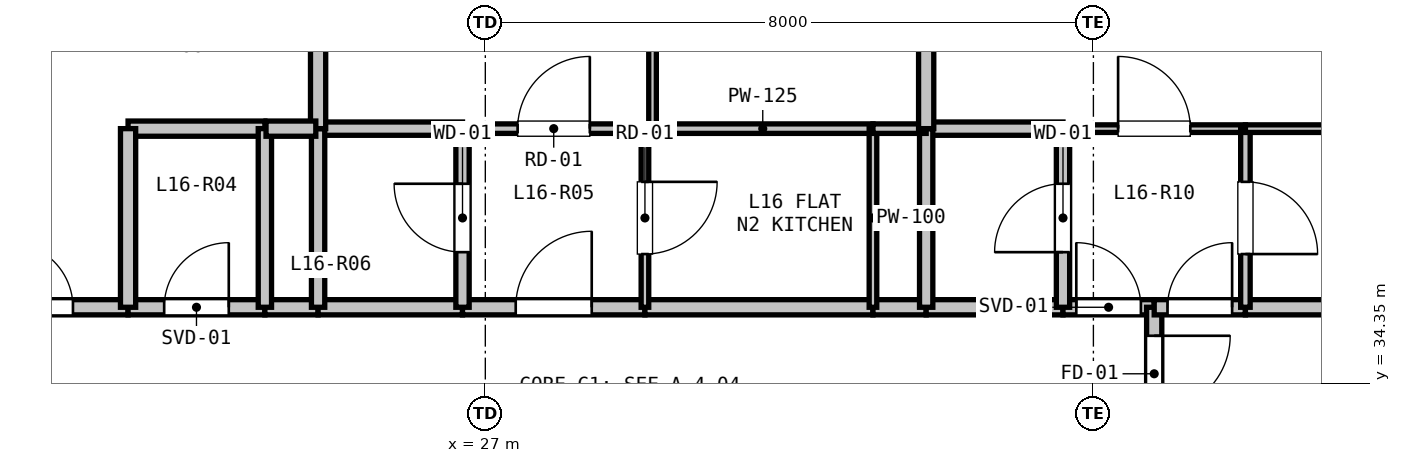
"""IFC4 building model, lengths in metres.
Left out: names, types, materials, properties, quantities, classifications, styles, units other than length and angle.
Written with IfcOpenShell. Run it as: python <this file> out.ifc"""

import sys

from ifc_helpers import new_model, si_unit, direction, frame, frame_2d, origin, place, context, subcontext, project, spatial, rectangle, extrude, element, fill, save


model = new_model("IFC4")
c1 = context("Model", 3, precision=1e-05, world=origin(), true_north=direction((0.0, 1.0)))
c2 = subcontext(c1, "Body", "Model", "MODEL_VIEW")
j1 = project(units=[si_unit("LENGTHUNIT", "METRE"), si_unit("PLANEANGLEUNIT", "RADIAN")], contexts=[c1])
p1 = place(None, origin())
s1 = spatial("IfcSite", under=j1, at=p1, CompositionType="ELEMENT")
p2 = place(p1, origin())
s2 = spatial("IfcBuilding", under=s1, at=p2, CompositionType="ELEMENT")
p3 = place(p2, frame((0.0, 0.0, 58.8)))
s3 = spatial("IfcBuildingStorey", under=s2, at=p3, CompositionType="ELEMENT", Elevation=58.8)
p4 = place(p3, frame((16.39, 36.617, 0.0), z_axis=(0.0, 0.0, 1.0), x_axis=(0.866027351828, 0.499996625875, 0.0)))
e1 = element("IfcWall", 1, at=p4, inside=s3, PredefinedType="PARAPET", context=c2, shape_type="SweptSolid", body=[
    extrude(rectangle(XDim=11.973, YDim=0.2, at=frame_2d((5.987, 0.0))), origin(), (0.0, 0.0, 1.0), 0.2),
])
p5 = place(p3, frame((20.0, 35.35, 0.0), z_axis=(0.0, 0.0, 1.0), x_axis=(1.0, 0.0, 0.0)))
e2 = element("IfcWall", 2, at=p5, inside=s3, PredefinedType="PARTITIONING", context=c2, shape_type="SweptSolid", body=[
    extrude(rectangle(XDim=2.3, YDim=0.2, at=frame_2d((1.15, 0.0))), origin(), (0.0, 0.0, 1.0), 3.02),
])
p6 = place(p5, frame((0.725, 0.0, 0.0)))
e3 = element("IfcOpeningElement", 3, at=p6, cuts=e2, PredefinedType="OPENING", context=c2, shape_type="SweptSolid", body=[
    extrude(rectangle(XDim=0.85, YDim=2.1, at=frame_2d((0.425, 1.05))), frame((0.0, 0.11, 0.0), z_axis=(0.0, -1.0, 0.0), x_axis=(1.0, 0.0, 0.0)), (0.0, 0.0, 1.0), 0.22),
])
p7 = place(p3, frame((22.3, 35.35, 0.0), z_axis=(0.0, 0.0, 1.0), x_axis=(1.0, 0.0, 0.0)))
e4 = element("IfcWall", 4, at=p7, inside=s3, PredefinedType="PARTITIONING", context=c2, shape_type="SweptSolid", body=[
    extrude(rectangle(XDim=1.8, YDim=0.2, at=frame_2d((0.9, 0.0))), origin(), (0.0, 0.0, 1.0), 3.02),
])
p8 = place(p7, frame((0.475, 0.0, 0.0)))
e5 = element("IfcOpeningElement", 5, at=p8, cuts=e4, PredefinedType="OPENING", context=c2, shape_type="SweptSolid", body=[
    extrude(rectangle(XDim=0.85, YDim=2.1, at=frame_2d((0.425, 1.05))), frame((0.0, 0.11, 0.0), z_axis=(0.0, -1.0, 0.0), x_axis=(1.0, 0.0, 0.0)), (0.0, 0.0, 1.0), 0.22),
])
p9 = place(p3, frame((24.1, 35.35, 0.0), z_axis=(0.0, 0.0, 1.0), x_axis=(1.0, 0.0, 0.0)))
e6 = element("IfcWall", 6, at=p9, inside=s3, PredefinedType="PARTITIONING", context=c2, shape_type="SweptSolid", body=[
    extrude(rectangle(XDim=0.7, YDim=0.2, at=frame_2d((0.35, 0.0))), origin(), (0.0, 0.0, 1.0), 3.02),
])
p10 = place(p3, frame((24.8, 35.35, 0.0), z_axis=(0.0, 0.0, 1.0), x_axis=(1.0, 0.0, 0.0)))
e7 = element("IfcWall", 7, at=p10, inside=s3, PredefinedType="PARTITIONING", context=c2, shape_type="SweptSolid", body=[
    extrude(rectangle(XDim=1.9, YDim=0.2, at=frame_2d((0.95, 0.0))), origin(), (0.0, 0.0, 1.0), 3.02),
])
p11 = place(p3, frame((26.7, 35.35, 0.0), z_axis=(0.0, 0.0, 1.0), x_axis=(1.0, 0.0, 0.0)))
e8 = element("IfcWall", 8, at=p11, inside=s3, PredefinedType="PARTITIONING", context=c2, shape_type="SweptSolid", body=[
    extrude(rectangle(XDim=2.4, YDim=0.2, at=frame_2d((1.2, 0.0))), origin(), (0.0, 0.0, 1.0), 3.02),
])
p12 = place(p11, frame((0.7, 0.0, 0.0)))
e9 = element("IfcOpeningElement", 9, at=p12, cuts=e8, PredefinedType="OPENING", context=c2, shape_type="SweptSolid", body=[
    extrude(rectangle(XDim=1.0, YDim=2.15, at=frame_2d((0.5, 1.075))), frame((0.0, 0.11, 0.0), z_axis=(0.0, -1.0, 0.0), x_axis=(1.0, 0.0, 0.0)), (0.0, 0.0, 1.0), 0.22),
])
p13 = place(p3, frame((29.1, 35.35, 0.0), z_axis=(0.0, 0.0, 1.0), x_axis=(1.0, 0.0, 0.0)))
e10 = element("IfcWall", 10, at=p13, inside=s3, PredefinedType="PARTITIONING", context=c2, shape_type="SweptSolid", body=[
    extrude(rectangle(XDim=3.0, YDim=0.2, at=frame_2d((1.5, 0.0))), origin(), (0.0, 0.0, 1.0), 3.02),
])
p14 = place(p3, frame((32.1, 35.35, 0.0), z_axis=(0.0, 0.0, 1.0), x_axis=(1.0, 0.0, 0.0)))
e11 = element("IfcWall", 11, at=p14, inside=s3, PredefinedType="PARTITIONING", context=c2, shape_type="SweptSolid", body=[
    extrude(rectangle(XDim=0.7, YDim=0.2, at=frame_2d((0.35, 0.0))), origin(), (0.0, 0.0, 1.0), 3.02),
])
p15 = place(p3, frame((32.8, 35.35, 0.0), z_axis=(0.0, 0.0, 1.0), x_axis=(1.0, 0.0, 0.0)))
e12 = element("IfcWall", 12, at=p15, inside=s3, PredefinedType="PARTITIONING", context=c2, shape_type="SweptSolid", body=[
    extrude(rectangle(XDim=1.8, YDim=0.2, at=frame_2d((0.9, 0.0))), origin(), (0.0, 0.0, 1.0), 3.02),
])
p16 = place(p3, frame((34.6, 35.35, 0.0), z_axis=(0.0, 0.0, 1.0), x_axis=(1.0, 0.0, 0.0)))
e13 = element("IfcWall", 13, at=p16, inside=s3, PredefinedType="PARTITIONING", context=c2, shape_type="SweptSolid", body=[
    extrude(rectangle(XDim=1.2, YDim=0.2, at=frame_2d((0.6, 0.0))), origin(), (0.0, 0.0, 1.0), 3.02),
])
p17 = place(p16, frame((0.175, 0.0, 0.0)))
e14 = element("IfcOpeningElement", 14, at=p17, cuts=e13, PredefinedType="OPENING", context=c2, shape_type="SweptSolid", body=[
    extrude(rectangle(XDim=0.85, YDim=2.1, at=frame_2d((0.425, 1.05))), frame((0.0, 0.11, 0.0), z_axis=(0.0, -1.0, 0.0), x_axis=(1.0, 0.0, 0.0)), (0.0, 0.0, 1.0), 0.22),
])
p18 = place(p3, frame((35.8, 35.35, 0.0), z_axis=(0.0, 0.0, 1.0), x_axis=(0.0, -1.0, 0.0)))
e15 = element("IfcWall", 15, at=p18, inside=s3, PredefinedType="PARTITIONING", context=c2, shape_type="SweptSolid", body=[
    extrude(rectangle(XDim=1.75, YDim=0.2, at=frame_2d((0.875, 0.0))), origin(), (0.0, 0.0, 1.0), 3.02),
])
p19 = place(p18, frame((0.375, 0.0, 0.0)))
e16 = element("IfcOpeningElement", 16, at=p19, cuts=e15, PredefinedType="OPENING", context=c2, shape_type="SweptSolid", body=[
    extrude(rectangle(XDim=1.0, YDim=2.15, at=frame_2d((0.5, 1.075))), frame((0.0, 0.11, 0.0), z_axis=(0.0, -1.0, 0.0), x_axis=(1.0, 0.0, 0.0)), (0.0, 0.0, 1.0), 0.22),
])
p20 = place(p3, frame((35.8, 35.35, 0.0), z_axis=(0.0, 0.0, 1.0), x_axis=(1.0, 0.0, 0.0)))
e17 = element("IfcWall", 17, at=p20, inside=s3, PredefinedType="PARTITIONING", context=c2, shape_type="SweptSolid", body=[
    extrude(rectangle(XDim=1.2, YDim=0.2, at=frame_2d((0.6, 0.0))), origin(), (0.0, 0.0, 1.0), 2.317),
])
p21 = place(p20, frame((0.175, 0.0, 0.0)))
e18 = element("IfcOpeningElement", 18, at=p21, cuts=e17, PredefinedType="OPENING", context=c2, shape_type="SweptSolid", body=[
    extrude(rectangle(XDim=0.85, YDim=2.1, at=frame_2d((0.425, 1.05))), frame((0.0, 0.11, 0.0), z_axis=(0.0, -1.0, 0.0), x_axis=(1.0, 0.0, 0.0)), (0.0, 0.0, 1.0), 0.22),
])
p22 = place(p3, frame((37.0, 35.35, 0.0), z_axis=(0.0, 0.0, 1.0), x_axis=(1.0, 0.0, 0.0)))
e19 = element("IfcWall", 19, at=p22, inside=s3, PredefinedType="PARTITIONING", context=c2, shape_type="SweptSolid", body=[
    extrude(rectangle(XDim=1.4, YDim=0.2, at=frame_2d((0.7, 0.0))), origin(), (0.0, 0.0, 1.0), 2.317),
])
p23 = place(p3, frame((26.7, 37.7, 0.0), z_axis=(0.0, 0.0, 1.0), x_axis=(1.0, 0.0, 0.0)))
e20 = element("IfcWall", 20, at=p23, inside=s3, PredefinedType="PARTITIONING", context=c2, shape_type="SweptSolid", body=[
    extrude(rectangle(XDim=2.4, YDim=0.125, at=frame_2d((1.2, 0.0))), origin(), (0.0, 0.0, 1.0), 3.02),
])
p24 = place(p23, frame((0.725, 0.0, 0.0)))
e21 = element("IfcOpeningElement", 21, at=p24, cuts=e20, PredefinedType="OPENING", context=c2, shape_type="SweptSolid", body=[
    extrude(rectangle(XDim=0.95, YDim=2.1, at=frame_2d((0.475, 1.05))), frame((0.0, 0.073, 0.0), z_axis=(0.0, -1.0, 0.0), x_axis=(1.0, 0.0, 0.0)), (0.0, 0.0, 1.0), 0.145),
])
p25 = place(p3, frame((29.1, 37.7, 0.0), z_axis=(0.0, 0.0, 1.0), x_axis=(0.0, -1.0, 0.0)))
e22 = element("IfcWall", 22, at=p25, inside=s3, PredefinedType="PARTITIONING", context=c2, shape_type="SweptSolid", body=[
    extrude(rectangle(XDim=2.35, YDim=0.1, at=frame_2d((1.175, 0.0))), origin(), (0.0, 0.0, 1.0), 3.02),
])
p26 = place(p25, frame((0.7, 0.0, 0.0)))
e23 = element("IfcOpeningElement", 23, at=p26, cuts=e22, PredefinedType="OPENING", context=c2, shape_type="SweptSolid", body=[
    extrude(rectangle(XDim=0.95, YDim=2.1, at=frame_2d((0.475, 1.05))), frame((0.0, 0.06, 0.0), z_axis=(0.0, -1.0, 0.0), x_axis=(1.0, 0.0, 0.0)), (0.0, 0.0, 1.0), 0.12),
])
p27 = place(p3, frame((26.7, 35.35, 0.0), z_axis=(0.0, 0.0, 1.0), x_axis=(0.0, 1.0, 0.0)))
e24 = element("IfcWall", 24, at=p27, inside=s3, PredefinedType="PLUMBINGWALL", context=c2, shape_type="SweptSolid", body=[
    extrude(rectangle(XDim=2.35, YDim=0.175, at=frame_2d((1.175, 0.0))), origin(), (0.0, 0.0, 1.0), 3.02),
])
p28 = place(p27, frame((0.725, 0.0, 0.0)))
e25 = element("IfcOpeningElement", 25, at=p28, cuts=e24, PredefinedType="OPENING", context=c2, shape_type="SweptSolid", body=[
    extrude(rectangle(XDim=0.9, YDim=2.1, at=frame_2d((0.45, 1.05))), frame((0.0, 0.097, 0.0), z_axis=(0.0, -1.0, 0.0), x_axis=(1.0, 0.0, 0.0)), (0.0, 0.0, 1.0), 0.195),
])
p29 = place(p3, frame((34.6, 37.7, 0.0), z_axis=(0.0, 0.0, 1.0), x_axis=(1.0, 0.0, 0.0)))
e26 = element("IfcWall", 26, at=p29, inside=s3, PredefinedType="PARTITIONING", context=c2, shape_type="SweptSolid", body=[
    extrude(rectangle(XDim=2.4, YDim=0.1, at=frame_2d((1.2, 0.0))), origin(), (0.0, 0.0, 1.0), 2.317),
])
p30 = place(p29, frame((0.725, 0.0, 0.0)))
e27 = element("IfcOpeningElement", 27, at=p30, cuts=e26, PredefinedType="OPENING", context=c2, shape_type="SweptSolid", body=[
    extrude(rectangle(XDim=0.95, YDim=2.1, at=frame_2d((0.475, 1.05))), frame((0.0, 0.06, 0.0), z_axis=(0.0, -1.0, 0.0), x_axis=(1.0, 0.0, 0.0)), (0.0, 0.0, 1.0), 0.12),
])
p31 = place(p3, frame((37.0, 37.7, 0.0), z_axis=(0.0, 0.0, 1.0), x_axis=(0.0, -1.0, 0.0)))
e28 = element("IfcWall", 28, at=p31, inside=s3, PredefinedType="PARTITIONING", context=c2, shape_type="SweptSolid", body=[
    extrude(rectangle(XDim=2.35, YDim=0.125, at=frame_2d((1.175, 0.0))), origin(), (0.0, 0.0, 1.0), 2.317),
])
p32 = place(p31, frame((0.7, 0.0, 0.0)))
e29 = element("IfcOpeningElement", 29, at=p32, cuts=e28, PredefinedType="OPENING", context=c2, shape_type="SweptSolid", body=[
    extrude(rectangle(XDim=0.95, YDim=2.1, at=frame_2d((0.475, 1.05))), frame((0.0, 0.073, 0.0), z_axis=(0.0, -1.0, 0.0), x_axis=(1.0, 0.0, 0.0)), (0.0, 0.0, 1.0), 0.145),
])
p33 = place(p3, frame((34.6, 35.35, 0.0), z_axis=(0.0, 0.0, 1.0), x_axis=(0.0, 1.0, 0.0)))
e30 = element("IfcWall", 30, at=p33, inside=s3, PredefinedType="PLUMBINGWALL", context=c2, shape_type="SweptSolid", body=[
    extrude(rectangle(XDim=2.35, YDim=0.175, at=frame_2d((1.175, 0.0))), origin(), (0.0, 0.0, 1.0), 3.02),
])
p34 = place(p33, frame((0.725, 0.0, 0.0)))
e31 = element("IfcOpeningElement", 31, at=p34, cuts=e30, PredefinedType="OPENING", context=c2, shape_type="SweptSolid", body=[
    extrude(rectangle(XDim=0.9, YDim=2.1, at=frame_2d((0.45, 1.05))), frame((0.0, 0.097, 0.0), z_axis=(0.0, -1.0, 0.0), x_axis=(1.0, 0.0, 0.0)), (0.0, 0.0, 1.0), 0.195),
])
p35 = place(p3, frame((22.3, 37.7, 0.0), z_axis=(0.0, 0.0, 1.0), x_axis=(1.0, 0.0, 0.0)))
e32 = element("IfcWall", 32, at=p35, inside=s3, PredefinedType="PARTITIONING", context=c2, shape_type="SweptSolid", body=[
    extrude(rectangle(XDim=1.8, YDim=0.2, at=frame_2d((0.9, 0.0))), origin(), (0.0, 0.0, 1.0), 3.02),
])
p36 = place(p3, frame((24.1, 37.7, 0.0), z_axis=(0.0, 0.0, 1.0), x_axis=(0.0, -1.0, 0.0)))
e33 = element("IfcWall", 33, at=p36, inside=s3, PredefinedType="PLUMBINGWALL", context=c2, shape_type="SweptSolid", body=[
    extrude(rectangle(XDim=2.35, YDim=0.175, at=frame_2d((1.175, 0.0))), origin(), (0.0, 0.0, 1.0), 3.02),
])
p37 = place(p3, frame((22.3, 35.35, 0.0), z_axis=(0.0, 0.0, 1.0), x_axis=(0.0, 1.0, 0.0)))
e34 = element("IfcWall", 34, at=p37, inside=s3, PredefinedType="PARTITIONING", context=c2, shape_type="SweptSolid", body=[
    extrude(rectangle(XDim=2.35, YDim=0.2, at=frame_2d((1.175, 0.0))), origin(), (0.0, 0.0, 1.0), 3.02),
])
p38 = place(p3, frame((24.8, 37.7, 0.0), z_axis=(0.0, 0.0, 1.0), x_axis=(1.0, 0.0, 0.0)))
e35 = element("IfcWall", 35, at=p38, inside=s3, PredefinedType="PLUMBINGWALL", context=c2, shape_type="SweptSolid", body=[
    extrude(rectangle(XDim=1.9, YDim=0.175, at=frame_2d((0.95, 0.0))), origin(), (0.0, 0.0, 1.0), 3.02),
])
p39 = place(p3, frame((24.8, 35.35, 0.0), z_axis=(0.0, 0.0, 1.0), x_axis=(0.0, 1.0, 0.0)))
e36 = element("IfcWall", 36, at=p39, inside=s3, PredefinedType="PLUMBINGWALL", context=c2, shape_type="SweptSolid", body=[
    extrude(rectangle(XDim=2.35, YDim=0.175, at=frame_2d((1.175, 0.0))), origin(), (0.0, 0.0, 1.0), 3.02),
])
p40 = place(p3, frame((29.2, 37.7, 0.0), z_axis=(0.0, 0.0, 1.0), x_axis=(1.0, 0.0, 0.0)))
e37 = element("IfcWall", 37, at=p40, inside=s3, PredefinedType="PARTITIONING", context=c2, shape_type="SweptSolid", body=[
    extrude(rectangle(XDim=2.9, YDim=0.125, at=frame_2d((1.45, 0.0))), origin(), (0.0, 0.0, 1.0), 3.02),
])
p41 = place(p3, frame((32.1, 37.7, 0.0), z_axis=(0.0, 0.0, 1.0), x_axis=(0.0, -1.0, 0.0)))
e38 = element("IfcWall", 38, at=p41, inside=s3, PredefinedType="PARTITIONING", context=c2, shape_type="SweptSolid", body=[
    extrude(rectangle(XDim=2.35, YDim=0.1, at=frame_2d((1.175, 0.0))), origin(), (0.0, 0.0, 1.0), 3.02),
])
p42 = place(p3, frame((32.8, 37.7, 0.0), z_axis=(0.0, 0.0, 1.0), x_axis=(1.0, 0.0, 0.0)))
e39 = element("IfcWall", 39, at=p42, inside=s3, PredefinedType="PLUMBINGWALL", context=c2, shape_type="SweptSolid", body=[
    extrude(rectangle(XDim=1.8, YDim=0.175, at=frame_2d((0.9, 0.0))), origin(), (0.0, 0.0, 1.0), 3.02),
])
p43 = place(p3, frame((32.8, 35.35, 0.0), z_axis=(0.0, 0.0, 1.0), x_axis=(0.0, 1.0, 0.0)))
e40 = element("IfcWall", 40, at=p43, inside=s3, PredefinedType="PLUMBINGWALL", context=c2, shape_type="SweptSolid", body=[
    extrude(rectangle(XDim=2.35, YDim=0.175, at=frame_2d((1.175, 0.0))), origin(), (0.0, 0.0, 1.0), 3.02),
])
p44 = place(p3, frame((37.0, 37.7, 0.0), z_axis=(0.0, 0.0, 1.0), x_axis=(1.0, 0.0, 0.0)))
e41 = element("IfcWall", 41, at=p44, inside=s3, PredefinedType="PARTITIONING", context=c2, shape_type="SweptSolid", body=[
    extrude(rectangle(XDim=6.688, YDim=0.1, at=frame_2d((3.344, 0.0))), origin(), (0.0, 0.0, 1.0), 2.317),
])
p45 = place(p44, frame((2.869, 0.0, 0.0)))
e42 = element("IfcOpeningElement", 42, at=p45, cuts=e41, PredefinedType="OPENING", context=c2, shape_type="SweptSolid", body=[
    extrude(rectangle(XDim=0.95, YDim=2.1, at=frame_2d((0.475, 1.05))), frame((0.0, 0.06, 0.0), z_axis=(0.0, -1.0, 0.0), x_axis=(1.0, 0.0, 0.0)), (0.0, 0.0, 1.0), 0.12),
])
p46 = place(p3, frame((24.8, 41.431, 0.0), z_axis=(0.0, 0.0, 1.0), x_axis=(0.0, -1.0, 0.0)))
e43 = element("IfcWall", 43, at=p46, inside=s3, PredefinedType="PARTITIONING", context=c2, shape_type="SweptSolid", body=[
    extrude(rectangle(XDim=3.731, YDim=0.2, at=frame_2d((1.865, 0.0))), origin(), (0.0, 0.0, 1.0), 2.365),
])
p47 = place(p3, frame((24.77, 37.7, 0.0), z_axis=(0.0, 0.0, 1.0), x_axis=(-1.0, 0.0, 0.0)))
e44 = element("IfcWall", 44, at=p47, inside=s3, PredefinedType="PARTITIONING", context=c2, shape_type="SweptSolid", body=[
    extrude(rectangle(XDim=0.655, YDim=0.2, at=frame_2d((0.328, 0.0))), origin(), (0.0, 0.0, 1.0), 3.02),
])
p48 = place(p3, frame((29.2, 43.826, 0.0), z_axis=(0.0, 0.0, 1.0), x_axis=(0.0, -1.0, 0.0)))
e45 = element("IfcWall", 45, at=p48, inside=s3, PredefinedType="PARTITIONING", context=c2, shape_type="SweptSolid", body=[
    extrude(rectangle(XDim=6.126, YDim=0.1, at=frame_2d((3.063, 0.0))), origin(), (0.0, 0.0, 1.0), 2.365),
])
p49 = place(p48, frame((2.588, 0.0, 0.0)))
e46 = element("IfcOpeningElement", 46, at=p49, cuts=e45, PredefinedType="OPENING", context=c2, shape_type="SweptSolid", body=[
    extrude(rectangle(XDim=0.95, YDim=2.1, at=frame_2d((0.475, 1.05))), frame((0.0, 0.06, 0.0), z_axis=(0.0, -1.0, 0.0), x_axis=(1.0, 0.0, 0.0)), (0.0, 0.0, 1.0), 0.12),
])
p50 = place(p3, frame((32.8, 37.7, 0.0), z_axis=(0.0, 0.0, 1.0), x_axis=(-1.0, 0.0, 0.0)))
e47 = element("IfcWall", 47, at=p50, inside=s3, PredefinedType="PARTITIONING", context=c2, shape_type="SweptSolid", body=[
    extrude(rectangle(XDim=0.7, YDim=0.125, at=frame_2d((0.35, 0.0))), origin(), (0.0, 0.0, 1.0), 3.02),
])
p51 = place(p3, frame((32.8, 45.905, 0.0), z_axis=(0.0, 0.0, 1.0), x_axis=(0.0, -1.0, 0.0)))
e48 = element("IfcWall", 48, at=p51, inside=s3, PredefinedType="PARTITIONING", context=c2, shape_type="SweptSolid", body=[
    extrude(rectangle(XDim=8.205, YDim=0.2, at=frame_2d((4.103, 0.0))), origin(), (0.0, 0.0, 1.0), 2.365),
])
p52 = place(p19, origin())
e49 = element("IfcDoor", 49, at=p52, inside=s3, OperationType="SINGLE_SWING_LEFT", PredefinedType="DOOR", context=c2, shape_type="SweptSolid", body=[
    extrude(rectangle(XDim=1.0, YDim=2.15, at=frame_2d((0.5, 1.075))), frame((0.0, 0.025, 0.0), z_axis=(0.0, -1.0, 0.0), x_axis=(1.0, 0.0, 0.0)), (0.0, 0.0, 1.0), 0.05),
])
fill(e16, e49)
p53 = place(p12, origin())
e50 = element("IfcDoor", 50, at=p53, inside=s3, OperationType="SINGLE_SWING_RIGHT", PredefinedType="DOOR", context=c2, shape_type="SweptSolid", body=[
    extrude(rectangle(XDim=1.0, YDim=2.15, at=frame_2d((0.5, 1.075))), frame((0.0, 0.025, 0.0), z_axis=(0.0, -1.0, 0.0), x_axis=(1.0, 0.0, 0.0)), (0.0, 0.0, 1.0), 0.05),
])
fill(e9, e50)
p54 = place(p17, origin())
e51 = element("IfcDoor", 51, at=p54, inside=s3, OperationType="SINGLE_SWING_LEFT", PredefinedType="DOOR", context=c2, shape_type="SweptSolid", body=[
    extrude(rectangle(XDim=0.85, YDim=2.1, at=frame_2d((0.425, 1.05))), frame((0.0, 0.025, 0.0), z_axis=(0.0, -1.0, 0.0), x_axis=(1.0, 0.0, 0.0)), (0.0, 0.0, 1.0), 0.05),
])
fill(e14, e51)
p55 = place(p8, origin())
e52 = element("IfcDoor", 52, at=p55, inside=s3, OperationType="SINGLE_SWING_RIGHT", PredefinedType="DOOR", context=c2, shape_type="SweptSolid", body=[
    extrude(rectangle(XDim=0.85, YDim=2.1, at=frame_2d((0.425, 1.05))), frame((0.0, 0.025, 0.0), z_axis=(0.0, -1.0, 0.0), x_axis=(1.0, 0.0, 0.0)), (0.0, 0.0, 1.0), 0.05),
])
fill(e5, e52)
p56 = place(p6, origin())
e53 = element("IfcDoor", 53, at=p56, inside=s3, OperationType="SINGLE_SWING_LEFT", PredefinedType="DOOR", context=c2, shape_type="SweptSolid", body=[
    extrude(rectangle(XDim=0.85, YDim=2.1, at=frame_2d((0.425, 1.05))), frame((0.0, 0.025, 0.0), z_axis=(0.0, -1.0, 0.0), x_axis=(1.0, 0.0, 0.0)), (0.0, 0.0, 1.0), 0.05),
])
fill(e3, e53)
p57 = place(p21, origin())
e54 = element("IfcDoor", 54, at=p57, inside=s3, OperationType="SINGLE_SWING_RIGHT", PredefinedType="DOOR", context=c2, shape_type="SweptSolid", body=[
    extrude(rectangle(XDim=0.85, YDim=2.1, at=frame_2d((0.425, 1.05))), frame((0.0, 0.025, 0.0), z_axis=(0.0, -1.0, 0.0), x_axis=(1.0, 0.0, 0.0)), (0.0, 0.0, 1.0), 0.05),
])
fill(e18, e54)
p58 = place(p28, origin())
e55 = element("IfcDoor", 55, at=p58, inside=s3, OperationType="SINGLE_SWING_RIGHT", PredefinedType="DOOR", context=c2, shape_type="SweptSolid", body=[
    extrude(rectangle(XDim=0.9, YDim=2.1, at=frame_2d((0.45, 1.05))), frame((0.0, 0.025, 0.0), z_axis=(0.0, -1.0, 0.0), x_axis=(1.0, 0.0, 0.0)), (0.0, 0.0, 1.0), 0.05),
])
fill(e25, e55)
p59 = place(p26, origin())
e56 = element("IfcDoor", 56, at=p59, inside=s3, OperationType="SINGLE_SWING_LEFT", PredefinedType="DOOR", context=c2, shape_type="SweptSolid", body=[
    extrude(rectangle(XDim=0.95, YDim=2.1, at=frame_2d((0.475, 1.05))), frame((0.0, 0.025, 0.0), z_axis=(0.0, -1.0, 0.0), x_axis=(1.0, 0.0, 0.0)), (0.0, 0.0, 1.0), 0.05),
])
fill(e23, e56)
p60 = place(p24, origin())
e57 = element("IfcDoor", 57, at=p60, inside=s3, OperationType="SINGLE_SWING_RIGHT", PredefinedType="DOOR", context=c2, shape_type="SweptSolid", body=[
    extrude(rectangle(XDim=0.95, YDim=2.1, at=frame_2d((0.475, 1.05))), frame((0.0, 0.025, 0.0), z_axis=(0.0, -1.0, 0.0), x_axis=(1.0, 0.0, 0.0)), (0.0, 0.0, 1.0), 0.05),
])
fill(e21, e57)
p61 = place(p34, origin())
e58 = element("IfcDoor", 58, at=p61, inside=s3, OperationType="SINGLE_SWING_LEFT", PredefinedType="DOOR", context=c2, shape_type="SweptSolid", body=[
    extrude(rectangle(XDim=0.9, YDim=2.1, at=frame_2d((0.45, 1.05))), frame((0.0, 0.025, 0.0), z_axis=(0.0, -1.0, 0.0), x_axis=(1.0, 0.0, 0.0)), (0.0, 0.0, 1.0), 0.05),
])
fill(e31, e58)
p62 = place(p32, origin())
e59 = element("IfcDoor", 59, at=p62, inside=s3, OperationType="SINGLE_SWING_RIGHT", PredefinedType="DOOR", context=c2, shape_type="SweptSolid", body=[
    extrude(rectangle(XDim=0.95, YDim=2.1, at=frame_2d((0.475, 1.05))), frame((0.0, 0.025, 0.0), z_axis=(0.0, -1.0, 0.0), x_axis=(1.0, 0.0, 0.0)), (0.0, 0.0, 1.0), 0.05),
])
fill(e29, e59)
p63 = place(p30, origin())
e60 = element("IfcDoor", 60, at=p63, inside=s3, OperationType="SINGLE_SWING_LEFT", PredefinedType="DOOR", context=c2, shape_type="SweptSolid", body=[
    extrude(rectangle(XDim=0.95, YDim=2.1, at=frame_2d((0.475, 1.05))), frame((0.0, 0.025, 0.0), z_axis=(0.0, -1.0, 0.0), x_axis=(1.0, 0.0, 0.0)), (0.0, 0.0, 1.0), 0.05),
])
fill(e27, e60)
save(model, sys.argv[1])
